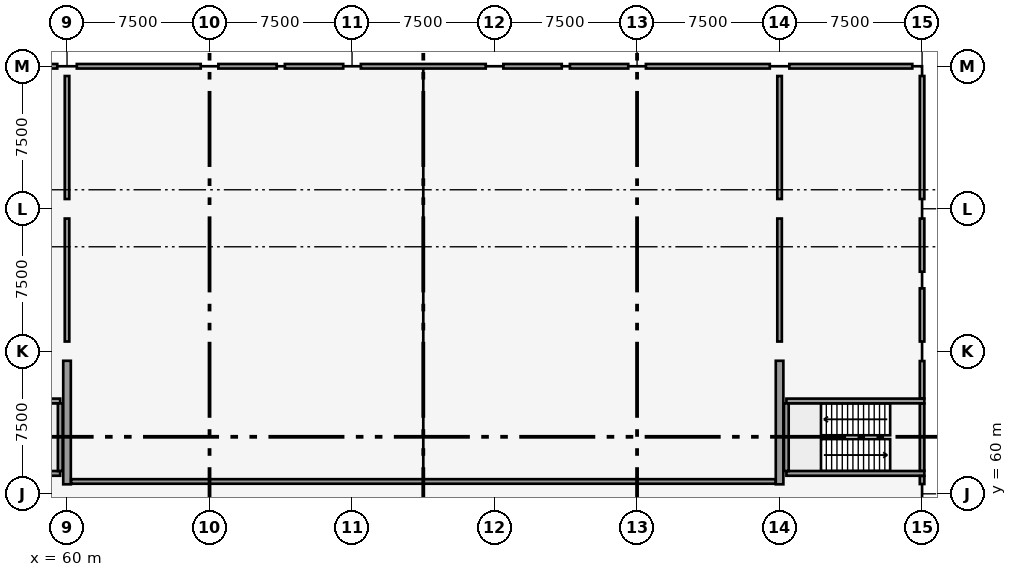
"""IFC4 building model, lengths in metres.
Left out: names, types, materials, properties, quantities, classifications, styles, units other than length and angle.
Written with IfcOpenShell. Run it as: python <this file> out.ifc"""

import sys

from ifc_helpers import new_model, si_unit, direction, frame, frame_2d, origin, origin_2d, place, context, subcontext, project, spatial, rectangle, extrude, element, fill, save


model = new_model("IFC4")
c1 = context("Model", 3, precision=1e-05, world=origin(), true_north=direction((0.0, 1.0)))
c2 = subcontext(c1, "Body", "Model", "MODEL_VIEW")
j1 = project(units=[si_unit("LENGTHUNIT", "METRE"), si_unit("PLANEANGLEUNIT", "RADIAN")], contexts=[c1])
p1 = place(None, origin())
s1 = spatial("IfcSite", under=j1, at=p1, CompositionType="ELEMENT")
p2 = place(p1, origin())
s2 = spatial("IfcBuilding", under=s1, at=p2, CompositionType="ELEMENT")
p3 = place(p2, frame((0.0, 0.0, -4.8)))
s3 = spatial("IfcBuildingStorey", under=s2, at=p3, CompositionType="ELEMENT", Elevation=-4.8)
for number, where, z_axis, x_axis in (
    (1, (60.0, 60.0, 0.0), (0.0, 0.0, 1.0), (1.0, 0.0, 0.0)),
    (2, (60.0, 67.5, 0.0), (0.0, 0.0, 1.0), (1.0, 0.0, 0.0)),
    (3, (60.0, 75.0, 0.0), (0.0, 0.0, 1.0), (1.0, 0.0, 0.0)),
    (4, (60.0, 82.5, 0.0), (0.0, 0.0, 1.0), (1.0, 0.0, 0.0)),
):
    element("IfcColumn", number, at=place(p3, frame(where, z_axis=z_axis, x_axis=x_axis)), inside=s3, PredefinedType="COLUMN", context=c2, shape_type="SweptSolid", body=[
        extrude(rectangle(XDim=1.0, YDim=1.0, at=origin_2d()), origin(), (0.0, 0.0, 1.0), 4.8),
    ])
for number, where, z_axis, x_axis in (
    (5, (67.5, 75.0, 0.0), (0.0, 0.0, 1.0), (1.0, 0.0, 0.0)),
    (6, (67.5, 82.5, 0.0), (0.0, 0.0, 1.0), (1.0, 0.0, 0.0)),
    (7, (75.0, 60.0, 0.0), (0.0, 0.0, 1.0), (1.0, 0.0, 0.0)),
    (8, (75.0, 67.5, 0.0), (0.0, 0.0, 1.0), (1.0, 0.0, 0.0)),
    (9, (75.0, 75.0, 0.0), (0.0, 0.0, 1.0), (1.0, 0.0, 0.0)),
    (10, (75.0, 82.5, 0.0), (0.0, 0.0, 1.0), (1.0, 0.0, 0.0)),
    (11, (82.5, 75.0, 0.0), (0.0, 0.0, 1.0), (1.0, 0.0, 0.0)),
    (12, (82.5, 82.5, 0.0), (0.0, 0.0, 1.0), (1.0, 0.0, 0.0)),
    (13, (90.0, 60.0, 0.0), (0.0, 0.0, 1.0), (1.0, 0.0, 0.0)),
    (14, (90.0, 67.5, 0.0), (0.0, 0.0, 1.0), (1.0, 0.0, 0.0)),
    (15, (90.0, 75.0, 0.0), (0.0, 0.0, 1.0), (1.0, 0.0, 0.0)),
    (16, (90.0, 82.5, 0.0), (0.0, 0.0, 1.0), (1.0, 0.0, 0.0)),
):
    element("IfcColumn", number, at=place(p3, frame(where, z_axis=z_axis, x_axis=x_axis)), inside=s3, PredefinedType="COLUMN", context=c2, shape_type="SweptSolid", body=[
        extrude(rectangle(XDim=0.9, YDim=0.9, at=origin_2d()), origin(), (0.0, 0.0, 1.0), 4.8),
    ])
for number, where, z_axis, x_axis in (
    (17, (97.5, 60.0, 0.0), (0.0, 0.0, 1.0), (1.0, 0.0, 0.0)),
    (18, (97.5, 67.5, 0.0), (0.0, 0.0, 1.0), (1.0, 0.0, 0.0)),
    (19, (97.5, 75.0, 0.0), (0.0, 0.0, 1.0), (1.0, 0.0, 0.0)),
    (20, (97.5, 82.5, 0.0), (0.0, 0.0, 1.0), (1.0, 0.0, 0.0)),
    (21, (105.0, 60.0, 0.0), (0.0, 0.0, 1.0), (1.0, 0.0, 0.0)),
    (22, (105.0, 67.5, 0.0), (0.0, 0.0, 1.0), (1.0, 0.0, 0.0)),
    (23, (105.0, 75.0, 0.0), (0.0, 0.0, 1.0), (1.0, 0.0, 0.0)),
    (24, (105.0, 82.5, 0.0), (0.0, 0.0, 1.0), (1.0, 0.0, 0.0)),
):
    element("IfcColumn", number, at=place(p3, frame(where, z_axis=z_axis, x_axis=x_axis)), inside=s3, PredefinedType="COLUMN", context=c2, shape_type="SweptSolid", body=[
        extrude(rectangle(XDim=1.0, YDim=1.0, at=origin_2d()), origin(), (0.0, 0.0, 1.0), 4.8),
    ])
p4 = place(p3, frame((105.0, 71.25, 0.0), z_axis=(0.0, 0.0, 1.0), x_axis=(1.0, 0.0, 0.0)))
e25 = element("IfcColumn", 25, at=p4, inside=s3, PredefinedType="PILASTER", context=c2, shape_type="SweptSolid", body=[
    extrude(rectangle(XDim=0.45, YDim=0.85, at=origin_2d()), origin(), (0.0, 0.0, 1.0), 4.8),
])
for number, where, z_axis, x_axis in (
    (26, (71.25, 82.5, 0.0), (0.0, 0.0, 1.0), (1.0, 0.0, 0.0)),
    (27, (86.25, 82.5, 0.0), (0.0, 0.0, 1.0), (1.0, 0.0, 0.0)),
):
    element("IfcColumn", number, at=place(p3, frame(where, z_axis=z_axis, x_axis=x_axis)), inside=s3, PredefinedType="PILASTER", context=c2, shape_type="SweptSolid", body=[
        extrude(rectangle(XDim=0.4, YDim=0.7, at=origin_2d()), origin(), (0.0, 0.0, 1.0), 4.8),
    ])
p5 = place(p3, frame((60.0, 60.5, 0.0), z_axis=(0.0, 0.0, 1.0), x_axis=(0.0, 1.0, 0.0)))
e28 = element("IfcWall", 28, at=p5, inside=s3, PredefinedType="SHEAR", context=c2, shape_type="SweptSolid", body=[
    extrude(rectangle(XDim=6.5, YDim=0.4, at=frame_2d((3.25, 0.0))), origin(), (0.0, 0.0, 1.0), 2.7),
])
p6 = place(p3, frame((97.5, 60.5, 0.0), z_axis=(0.0, 0.0, 1.0), x_axis=(0.0, 1.0, 0.0)))
e29 = element("IfcWall", 29, at=p6, inside=s3, PredefinedType="SHEAR", context=c2, shape_type="SweptSolid", body=[
    extrude(rectangle(XDim=6.5, YDim=0.4, at=frame_2d((3.25, 0.0))), origin(), (0.0, 0.0, 1.0), 3.55),
])
p7 = place(p3, frame((52.38, 61.075, 0.0), z_axis=(0.0, 0.0, 1.0), x_axis=(1.0, 0.0, 0.0)))
e30 = element("IfcWall", 30, at=p7, inside=s3, PredefinedType="SOLIDWALL", context=c2, shape_type="SweptSolid", body=[
    extrude(rectangle(XDim=7.26, YDim=0.25, at=frame_2d((3.63, 0.0))), origin(), (0.0, 0.0, 1.0), 4.5),
])
p8 = place(p7, frame((0.62, 0.0, 0.0)))
e31 = element("IfcOpeningElement", 31, at=p8, cuts=e30, PredefinedType="OPENING", context=c2, shape_type="SweptSolid", body=[
    extrude(rectangle(XDim=1.1, YDim=2.15, at=frame_2d((0.55, 1.075))), frame((0.0, 0.135, 0.0), z_axis=(0.0, -1.0, 0.0), x_axis=(1.0, 0.0, 0.0)), (0.0, 0.0, 1.0), 0.27),
])
p9 = place(p3, frame((52.38, 64.885, 0.0), z_axis=(0.0, 0.0, 1.0), x_axis=(1.0, 0.0, 0.0)))
e32 = element("IfcWall", 32, at=p9, inside=s3, PredefinedType="SOLIDWALL", context=c2, shape_type="SweptSolid", body=[
    extrude(rectangle(XDim=7.26, YDim=0.25, at=frame_2d((3.63, 0.0))), origin(), (0.0, 0.0, 1.0), 4.5),
])
p10 = place(p9, frame((0.62, 0.0, 0.0)))
e33 = element("IfcOpeningElement", 33, at=p10, cuts=e32, PredefinedType="OPENING", context=c2, shape_type="SweptSolid", body=[
    extrude(rectangle(XDim=1.1, YDim=2.15, at=frame_2d((0.55, 1.075))), frame((0.0, 0.135, 0.0), z_axis=(0.0, -1.0, 0.0), x_axis=(1.0, 0.0, 0.0)), (0.0, 0.0, 1.0), 0.27),
])
p11 = place(p3, frame((59.645, 61.2, 0.0), z_axis=(0.0, 0.0, 1.0), x_axis=(0.0, 1.0, 0.0)))
e34 = element("IfcWall", 34, at=p11, inside=s3, PredefinedType="SOLIDWALL", context=c2, shape_type="SweptSolid", body=[
    extrude(rectangle(XDim=3.56, YDim=0.25, at=frame_2d((1.78, 0.0))), origin(), (0.0, 0.0, 1.0), 4.5),
])
p12 = place(p3, frame((97.86, 61.075, 0.0), z_axis=(0.0, 0.0, 1.0), x_axis=(1.0, 0.0, 0.0)))
e35 = element("IfcWall", 35, at=p12, inside=s3, PredefinedType="SOLIDWALL", context=c2, shape_type="SweptSolid", body=[
    extrude(rectangle(XDim=7.26, YDim=0.25, at=frame_2d((3.63, 0.0))), origin(), (0.0, 0.0, 1.0), 4.5),
])
p13 = place(p12, frame((5.54, 0.0, 0.0)))
e36 = element("IfcOpeningElement", 36, at=p13, cuts=e35, PredefinedType="OPENING", context=c2, shape_type="SweptSolid", body=[
    extrude(rectangle(XDim=1.1, YDim=2.15, at=frame_2d((0.55, 1.075))), frame((0.0, 0.135, 0.0), z_axis=(0.0, -1.0, 0.0), x_axis=(1.0, 0.0, 0.0)), (0.0, 0.0, 1.0), 0.27),
])
p14 = place(p3, frame((97.86, 64.885, 0.0), z_axis=(0.0, 0.0, 1.0), x_axis=(1.0, 0.0, 0.0)))
e37 = element("IfcWall", 37, at=p14, inside=s3, PredefinedType="SOLIDWALL", context=c2, shape_type="SweptSolid", body=[
    extrude(rectangle(XDim=7.26, YDim=0.25, at=frame_2d((3.63, 0.0))), origin(), (0.0, 0.0, 1.0), 4.5),
])
p15 = place(p14, frame((5.54, 0.0, 0.0)))
e38 = element("IfcOpeningElement", 38, at=p15, cuts=e37, PredefinedType="OPENING", context=c2, shape_type="SweptSolid", body=[
    extrude(rectangle(XDim=1.1, YDim=2.15, at=frame_2d((0.55, 1.075))), frame((0.0, 0.135, 0.0), z_axis=(0.0, -1.0, 0.0), x_axis=(1.0, 0.0, 0.0)), (0.0, 0.0, 1.0), 0.27),
])
p16 = place(p3, frame((97.855, 61.2, 0.0), z_axis=(0.0, 0.0, 1.0), x_axis=(0.0, 1.0, 0.0)))
e39 = element("IfcWall", 39, at=p16, inside=s3, PredefinedType="SOLIDWALL", context=c2, shape_type="SweptSolid", body=[
    extrude(rectangle(XDim=3.56, YDim=0.25, at=frame_2d((1.78, 0.0))), origin(), (0.0, 0.0, 1.0), 4.5),
])
p17 = place(p3, frame((53.014, 82.5, 0.0), z_axis=(0.0, 0.0, 1.0), x_axis=(1.0, 0.0, 0.0)))
e40 = element("IfcWall", 40, at=p17, inside=s3, PredefinedType="PARTITIONING", context=c2, shape_type="SweptSolid", body=[
    extrude(rectangle(XDim=6.472, YDim=0.24, at=frame_2d((3.236, 0.0))), origin(), (0.0, 0.0, 1.0), 3.87),
])
p18 = place(p3, frame((60.514, 82.5, 0.0), z_axis=(0.0, 0.0, 1.0), x_axis=(1.0, 0.0, 0.0)))
e41 = element("IfcWall", 41, at=p18, inside=s3, PredefinedType="PARTITIONING", context=c2, shape_type="SweptSolid", body=[
    extrude(rectangle(XDim=6.522, YDim=0.24, at=frame_2d((3.261, 0.0))), origin(), (0.0, 0.0, 1.0), 3.87),
])
for number, where, z_axis, x_axis in (
    (42, (67.964, 82.5, 0.0), (0.0, 0.0, 1.0), (1.0, 0.0, 0.0)),
    (43, (71.464, 82.5, 0.0), (0.0, 0.0, 1.0), (1.0, 0.0, 0.0)),
):
    element("IfcWall", number, at=place(p3, frame(where, z_axis=z_axis, x_axis=x_axis)), inside=s3, PredefinedType="PARTITIONING", context=c2, shape_type="SweptSolid", body=[
        extrude(rectangle(XDim=3.072, YDim=0.24, at=frame_2d((1.536, 0.0))), origin(), (0.0, 0.0, 1.0), 3.87),
    ])
p19 = place(p3, frame((75.464, 82.5, 0.0), z_axis=(0.0, 0.0, 1.0), x_axis=(1.0, 0.0, 0.0)))
e44 = element("IfcWall", 44, at=p19, inside=s3, PredefinedType="PARTITIONING", context=c2, shape_type="SweptSolid", body=[
    extrude(rectangle(XDim=6.572, YDim=0.24, at=frame_2d((3.286, 0.0))), origin(), (0.0, 0.0, 1.0), 3.87),
])
for number, where, z_axis, x_axis in (
    (45, (82.964, 82.5, 0.0), (0.0, 0.0, 1.0), (1.0, 0.0, 0.0)),
    (46, (86.464, 82.5, 0.0), (0.0, 0.0, 1.0), (1.0, 0.0, 0.0)),
):
    element("IfcWall", number, at=place(p3, frame(where, z_axis=z_axis, x_axis=x_axis)), inside=s3, PredefinedType="PARTITIONING", context=c2, shape_type="SweptSolid", body=[
        extrude(rectangle(XDim=3.072, YDim=0.24, at=frame_2d((1.536, 0.0))), origin(), (0.0, 0.0, 1.0), 3.87),
    ])
p20 = place(p3, frame((90.464, 82.5, 0.0), z_axis=(0.0, 0.0, 1.0), x_axis=(1.0, 0.0, 0.0)))
e47 = element("IfcWall", 47, at=p20, inside=s3, PredefinedType="PARTITIONING", context=c2, shape_type="SweptSolid", body=[
    extrude(rectangle(XDim=6.522, YDim=0.24, at=frame_2d((3.261, 0.0))), origin(), (0.0, 0.0, 1.0), 3.82),
])
p21 = place(p3, frame((98.014, 82.5, 0.0), z_axis=(0.0, 0.0, 1.0), x_axis=(1.0, 0.0, 0.0)))
e48 = element("IfcWall", 48, at=p21, inside=s3, PredefinedType="PARTITIONING", context=c2, shape_type="SweptSolid", body=[
    extrude(rectangle(XDim=6.472, YDim=0.24, at=frame_2d((3.236, 0.0))), origin(), (0.0, 0.0, 1.0), 3.82),
])
p22 = place(p3, frame((105.0, 60.514, 0.0), z_axis=(0.0, 0.0, 1.0), x_axis=(0.0, 1.0, 0.0)))
e49 = element("IfcWall", 49, at=p22, inside=s3, PredefinedType="PARTITIONING", context=c2, shape_type="SweptSolid", body=[
    extrude(rectangle(XDim=0.422, YDim=0.24, at=frame_2d((0.211, 0.0))), origin(), (0.0, 0.0, 1.0), 3.52),
])
p23 = place(p3, frame((105.0, 61.214, 0.0), z_axis=(0.0, 0.0, 1.0), x_axis=(0.0, 1.0, 0.0)))
e50 = element("IfcWall", 50, at=p23, inside=s3, PredefinedType="PARTITIONING", context=c2, shape_type="SweptSolid", body=[
    extrude(rectangle(XDim=3.532, YDim=0.24, at=frame_2d((1.766, 0.0))), origin(), (0.0, 0.0, 1.0), 3.87),
])
p24 = place(p3, frame((105.0, 65.024, 0.0), z_axis=(0.0, 0.0, 1.0), x_axis=(0.0, 1.0, 0.0)))
e51 = element("IfcWall", 51, at=p24, inside=s3, PredefinedType="PARTITIONING", context=c2, shape_type="SweptSolid", body=[
    extrude(rectangle(XDim=1.962, YDim=0.24, at=frame_2d((0.981, 0.0))), origin(), (0.0, 0.0, 1.0), 3.52),
])
p25 = place(p3, frame((105.0, 68.014, 0.0), z_axis=(0.0, 0.0, 1.0), x_axis=(0.0, 1.0, 0.0)))
e52 = element("IfcWall", 52, at=p25, inside=s3, PredefinedType="PARTITIONING", context=c2, shape_type="SweptSolid", body=[
    extrude(rectangle(XDim=2.797, YDim=0.24, at=frame_2d((1.398, 0.0))), origin(), (0.0, 0.0, 1.0), 3.52),
])
p26 = place(p3, frame((105.0, 71.689, 0.0), z_axis=(0.0, 0.0, 1.0), x_axis=(0.0, 1.0, 0.0)))
e53 = element("IfcWall", 53, at=p26, inside=s3, PredefinedType="PARTITIONING", context=c2, shape_type="SweptSolid", body=[
    extrude(rectangle(XDim=2.797, YDim=0.24, at=frame_2d((1.398, 0.0))), origin(), (0.0, 0.0, 1.0), 3.57),
])
p27 = place(p3, frame((105.0, 75.514, 0.0), z_axis=(0.0, 0.0, 1.0), x_axis=(0.0, 1.0, 0.0)))
e54 = element("IfcWall", 54, at=p27, inside=s3, PredefinedType="PARTITIONING", context=c2, shape_type="SweptSolid", body=[
    extrude(rectangle(XDim=6.472, YDim=0.24, at=frame_2d((3.236, 0.0))), origin(), (0.0, 0.0, 1.0), 3.57),
])
p28 = place(p3, frame((60.0, 68.014, 0.0), z_axis=(0.0, 0.0, 1.0), x_axis=(0.0, 1.0, 0.0)))
e55 = element("IfcWall", 55, at=p28, inside=s3, PredefinedType="PARTITIONING", context=c2, shape_type="SweptSolid", body=[
    extrude(rectangle(XDim=6.472, YDim=0.24, at=frame_2d((3.236, 0.0))), origin(), (0.0, 0.0, 1.0), 2.67),
])
p29 = place(p28, frame((2.436, 0.0, 0.0)))
e56 = element("IfcOpeningElement", 56, at=p29, cuts=e55, PredefinedType="OPENING", context=c2, shape_type="SweptSolid", body=[
    extrude(rectangle(XDim=1.6, YDim=2.15, at=frame_2d((0.8, 1.075))), frame((0.0, 0.13, 0.0), z_axis=(0.0, -1.0, 0.0), x_axis=(1.0, 0.0, 0.0)), (0.0, 0.0, 1.0), 0.26),
])
p30 = place(p3, frame((60.0, 75.514, 0.0), z_axis=(0.0, 0.0, 1.0), x_axis=(0.0, 1.0, 0.0)))
e57 = element("IfcWall", 57, at=p30, inside=s3, PredefinedType="PARTITIONING", context=c2, shape_type="SweptSolid", body=[
    extrude(rectangle(XDim=6.472, YDim=0.24, at=frame_2d((3.236, 0.0))), origin(), (0.0, 0.0, 1.0), 3.42),
])
p31 = place(p3, frame((97.5, 68.014, 0.0), z_axis=(0.0, 0.0, 1.0), x_axis=(0.0, 1.0, 0.0)))
e58 = element("IfcWall", 58, at=p31, inside=s3, PredefinedType="PARTITIONING", context=c2, shape_type="SweptSolid", body=[
    extrude(rectangle(XDim=6.472, YDim=0.24, at=frame_2d((3.236, 0.0))), origin(), (0.0, 0.0, 1.0), 3.52),
])
p32 = place(p31, frame((2.436, 0.0, 0.0)))
e59 = element("IfcOpeningElement", 59, at=p32, cuts=e58, PredefinedType="OPENING", context=c2, shape_type="SweptSolid", body=[
    extrude(rectangle(XDim=1.6, YDim=2.15, at=frame_2d((0.8, 1.075))), frame((0.0, 0.13, 0.0), z_axis=(0.0, -1.0, 0.0), x_axis=(1.0, 0.0, 0.0)), (0.0, 0.0, 1.0), 0.26),
])
p33 = place(p3, frame((97.5, 75.514, 0.0), z_axis=(0.0, 0.0, 1.0), x_axis=(0.0, 1.0, 0.0)))
e60 = element("IfcWall", 60, at=p33, inside=s3, PredefinedType="PARTITIONING", context=c2, shape_type="SweptSolid", body=[
    extrude(rectangle(XDim=6.472, YDim=0.24, at=frame_2d((3.236, 0.0))), origin(), (0.0, 0.0, 1.0), 3.57),
])
p34 = place(p3, frame((60.214, 60.65, 0.0), z_axis=(0.0, 0.0, 1.0), x_axis=(1.0, 0.0, 0.0)))
e61 = element("IfcWall", 61, at=p34, inside=s3, PredefinedType="PARTITIONING", context=c2, shape_type="SweptSolid", body=[
    extrude(rectangle(XDim=37.072, YDim=0.24, at=frame_2d((18.536, 0.0))), origin(), (0.0, 0.0, 1.0), 2.67),
])
p35 = place(p13, origin())
e62 = element("IfcDoor", 62, at=p35, inside=s3, OperationType="SINGLE_SWING_LEFT", PredefinedType="DOOR", context=c2, shape_type="SweptSolid", body=[
    extrude(rectangle(XDim=1.1, YDim=2.15, at=frame_2d((0.55, 1.075))), frame((0.0, 0.025, 0.0), z_axis=(0.0, -1.0, 0.0), x_axis=(1.0, 0.0, 0.0)), (0.0, 0.0, 1.0), 0.05),
])
fill(e36, e62)
p36 = place(p15, frame((1.1, 0.0, 0.0), z_axis=(0.0, 0.0, 1.0), x_axis=(-1.0, 0.0, 0.0)))
e63 = element("IfcDoor", 63, at=p36, inside=s3, OperationType="SINGLE_SWING_RIGHT", PredefinedType="DOOR", context=c2, shape_type="SweptSolid", body=[
    extrude(rectangle(XDim=1.1, YDim=2.15, at=frame_2d((0.55, 1.075))), frame((0.0, 0.025, 0.0), z_axis=(0.0, -1.0, 0.0), x_axis=(1.0, 0.0, 0.0)), (0.0, 0.0, 1.0), 0.05),
])
fill(e38, e63)
p37 = place(p29, origin())
e64 = element("IfcDoor", 64, at=p37, inside=s3, OperationType="SINGLE_SWING_LEFT", PredefinedType="DOOR", context=c2, shape_type="SweptSolid", body=[
    extrude(rectangle(XDim=1.6, YDim=2.15, at=frame_2d((0.8, 1.075))), frame((0.0, 0.025, 0.0), z_axis=(0.0, -1.0, 0.0), x_axis=(1.0, 0.0, 0.0)), (0.0, 0.0, 1.0), 0.05),
])
fill(e56, e64)
p38 = place(p32, origin())
e65 = element("IfcDoor", 65, at=p38, inside=s3, OperationType="SINGLE_SWING_LEFT", PredefinedType="DOOR", context=c2, shape_type="SweptSolid", body=[
    extrude(rectangle(XDim=1.6, YDim=2.15, at=frame_2d((0.8, 1.075))), frame((0.0, 0.025, 0.0), z_axis=(0.0, -1.0, 0.0), x_axis=(1.0, 0.0, 0.0)), (0.0, 0.0, 1.0), 0.05),
])
fill(e59, e65)
save(model, sys.argv[1])
